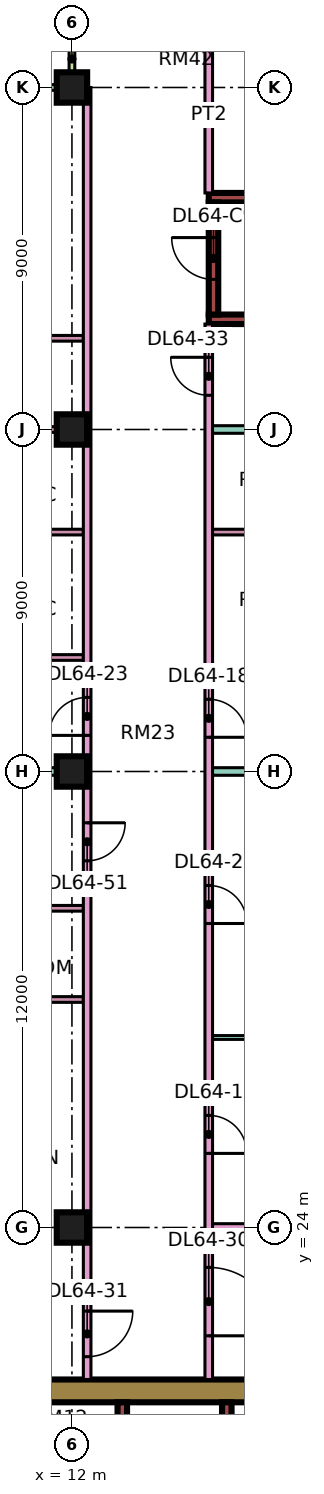
"""IFC4 building model, lengths in metres.
Left out: names, types, materials, properties, quantities, classifications, styles, units other than length and angle.
Written with IfcOpenShell. Run it as: python <this file> out.ifc"""

import sys

from ifc_helpers import new_model, si_unit, direction, frame, frame_2d, origin, origin_2d, place, context, subcontext, project, spatial, rectangle, extrude, element, fill, save


model = new_model("IFC4")
c1 = context("Model", 3, precision=1e-05, world=origin(), true_north=direction((0.0, 1.0)))
c2 = subcontext(c1, "Body", "Model", "MODEL_VIEW")
j1 = project(units=[si_unit("LENGTHUNIT", "METRE"), si_unit("PLANEANGLEUNIT", "RADIAN")], contexts=[c1])
p1 = place(None, origin())
s1 = spatial("IfcSite", under=j1, at=p1, CompositionType="ELEMENT")
p2 = place(p1, origin())
s2 = spatial("IfcBuilding", under=s1, at=p2, CompositionType="ELEMENT")
p3 = place(p2, frame((0.0, 0.0, 277.15)))
s3 = spatial("IfcBuildingStorey", under=s2, at=p3, CompositionType="ELEMENT", Elevation=277.15)
for number, where, z_axis, x_axis in (
    (1, (12.0, 24.0, 0.0), (0.0, 0.0, 1.0), (1.0, 0.0, 0.0)),
    (2, (12.0, 36.0, 0.0), (0.0, 0.0, 1.0), (1.0, 0.0, 0.0)),
    (3, (12.0, 45.0, 0.0), (0.0, 0.0, 1.0), (1.0, 0.0, 0.0)),
    (4, (12.0, 54.0, 0.0), (0.0, 0.0, 1.0), (1.0, 0.0, 0.0)),
):
    element("IfcColumn", number, at=place(p3, frame(where, z_axis=z_axis, x_axis=x_axis)), inside=s3, PredefinedType="COLUMN", context=c2, shape_type="SweptSolid", body=[
        extrude(rectangle(XDim=0.8, YDim=0.8, at=origin_2d()), origin(), (0.0, 0.0, 1.0), 3.75),
    ])
p4 = place(p3, frame((9.0, 19.7, 0.0), z_axis=(0.0, 0.0, 1.0), x_axis=(1.0, 0.0, 0.0)))
e5 = element("IfcWall", 5, at=p4, inside=s3, PredefinedType="SHEAR", context=c2, shape_type="SweptSolid", body=[
    extrude(rectangle(XDim=25.0, YDim=0.6, at=frame_2d((12.5, 0.0))), origin(), (0.0, 0.0, 1.0), 3.75),
])
p5 = place(p4, frame((19.1, 0.0, 0.0)))
e6 = element("IfcOpeningElement", 6, at=p5, cuts=e5, PredefinedType="OPENING", context=c2, shape_type="SweptSolid", body=[
    extrude(rectangle(XDim=1.8, YDim=2.4, at=frame_2d((0.9, 1.2))), frame((0.0, 0.31, 0.0), z_axis=(0.0, -1.0, 0.0), x_axis=(1.0, 0.0, 0.0)), (0.0, 0.0, 1.0), 0.62),
])
p6 = place(p3, frame((13.325, 7.6, 0.0), z_axis=(0.0, 0.0, 1.0), x_axis=(0.0, 1.0, 0.0)))
e7 = element("IfcWall", 7, at=p6, inside=s3, PredefinedType="SHEAR", context=c2, shape_type="SweptSolid", body=[
    extrude(rectangle(XDim=11.8, YDim=0.25, at=frame_2d((5.9, 0.0))), origin(), (0.0, 0.0, 1.0), 3.75),
])
p7 = place(p3, frame((16.075, 15.8, 0.0), z_axis=(0.0, 0.0, 1.0), x_axis=(0.0, 1.0, 0.0)))
e8 = element("IfcWall", 8, at=p7, inside=s3, PredefinedType="SHEAR", context=c2, shape_type="SweptSolid", body=[
    extrude(rectangle(XDim=3.6, YDim=0.25, at=frame_2d((1.8, 0.0))), origin(), (0.0, 0.0, 1.0), 3.75),
])
for number, where, z_axis, x_axis in (
    (9, (15.6, 47.9, 0.0), (0.0, 0.0, 1.0), (1.0, 0.0, 0.0)),
    (10, (15.6, 51.1, 0.0), (0.0, 0.0, 1.0), (1.0, 0.0, 0.0)),
):
    element("IfcWall", number, at=place(p3, frame(where, z_axis=z_axis, x_axis=x_axis)), inside=s3, PredefinedType="SHEAR", context=c2, shape_type="SweptSolid", body=[
        extrude(rectangle(XDim=7.0, YDim=0.25, at=frame_2d((3.5, 0.0))), origin(), (0.0, 0.0, 1.0), 3.75),
    ])
p8 = place(p3, frame((15.725, 48.025, 0.0), z_axis=(0.0, 0.0, 1.0), x_axis=(0.0, 1.0, 0.0)))
e11 = element("IfcWall", 11, at=p8, inside=s3, PredefinedType="SHEAR", context=c2, shape_type="SweptSolid", body=[
    extrude(rectangle(XDim=2.95, YDim=0.25, at=frame_2d((1.475, 0.0))), origin(), (0.0, 0.0, 1.0), 3.75),
])
p9 = place(p8, frame((0.925, 0.0, 0.0)))
e12 = element("IfcOpeningElement", 12, at=p9, cuts=e11, PredefinedType="OPENING", context=c2, shape_type="SweptSolid", body=[
    extrude(rectangle(XDim=1.1, YDim=2.2, at=frame_2d((0.55, 1.1))), frame((0.0, 0.135, 0.0), z_axis=(0.0, -1.0, 0.0), x_axis=(1.0, 0.0, 0.0)), (0.0, 0.0, 1.0), 0.27),
])
p10 = place(p3, frame((11.925, 54.0, 0.0), z_axis=(0.0, 0.0, 1.0), x_axis=(-1.0, 0.0, 0.0)))
e13 = element("IfcWall", 13, at=p10, inside=s3, PredefinedType="SOLIDWALL", context=c2, shape_type="SweptSolid", body=[
    extrude(rectangle(XDim=10.35, YDim=0.15, at=frame_2d((5.175, 0.0))), origin(), (0.0, 0.0, 1.0), 3.35),
])
p11 = place(p10, frame((0.875, 0.0, 0.45)))
e14 = element("IfcOpeningElement", 14, at=p11, cuts=e13, PredefinedType="OPENING", context=c2, shape_type="SweptSolid", body=[
    extrude(rectangle(XDim=3.0, YDim=2.4, at=frame_2d((1.5, 1.2))), frame((0.0, 0.085, 0.0), z_axis=(0.0, -1.0, 0.0), x_axis=(1.0, 0.0, 0.0)), (0.0, 0.0, 1.0), 0.17),
])
p12 = place(p10, frame((7.038, 0.0, 0.0)))
e15 = element("IfcOpeningElement", 15, at=p12, cuts=e13, PredefinedType="OPENING", context=c2, shape_type="SweptSolid", body=[
    extrude(rectangle(XDim=1.8, YDim=2.4, at=frame_2d((0.9, 1.2))), frame((0.0, 0.085, 0.0), z_axis=(0.0, -1.0, 0.0), x_axis=(1.0, 0.0, 0.0)), (0.0, 0.0, 1.0), 0.17),
])
p13 = place(p3, frame((12.0, 55.5, 0.0), z_axis=(0.0, 0.0, 1.0), x_axis=(0.0, -1.0, 0.0)))
e16 = element("IfcWall", 16, at=p13, inside=s3, PredefinedType="SOLIDWALL", context=c2, shape_type="SweptSolid", body=[
    extrude(rectangle(XDim=1.5, YDim=0.15, at=frame_2d((0.75, 0.0))), origin(), (0.0, 0.0, 1.0), 3.35),
])
p14 = place(p3, frame((-1.35, 22.4, 0.0), z_axis=(0.0, 0.0, 1.0), x_axis=(1.0, 0.0, 0.0)))
e17 = element("IfcWall", 17, at=p14, inside=s3, PredefinedType="PARTITIONING", context=c2, shape_type="SweptSolid", body=[
    extrude(rectangle(XDim=13.65, YDim=0.2, at=frame_2d((6.825, 0.0))), origin(), (0.0, 0.0, 1.0), 3.35),
])
p15 = place(p3, frame((0.0, 36.0, 0.0), z_axis=(0.0, 0.0, 1.0), x_axis=(1.0, 0.0, 0.0)))
e18 = element("IfcWall", 18, at=p15, inside=s3, PredefinedType="PARTITIONING", context=c2, shape_type="SweptSolid", body=[
    extrude(rectangle(XDim=12.3, YDim=0.2, at=frame_2d((6.15, 0.0))), origin(), (0.0, 0.0, 1.0), 3.35),
])
for number, where, z_axis, x_axis in (
    (19, (7.675, 39.0, 0.0), (0.0, 0.0, 1.0), (1.0, 0.0, 0.0)),
    (20, (7.675, 42.3, 0.0), (0.0, 0.0, 1.0), (1.0, 0.0, 0.0)),
    (21, (7.675, 45.0, 0.0), (0.0, 0.0, 1.0), (1.0, 0.0, 0.0)),
    (22, (7.675, 47.4, 0.0), (0.0, 0.0, 1.0), (1.0, 0.0, 0.0)),
):
    element("IfcWall", number, at=place(p3, frame(where, z_axis=z_axis, x_axis=x_axis)), inside=s3, PredefinedType="PARTITIONING", context=c2, shape_type="SweptSolid", body=[
        extrude(rectangle(XDim=4.625, YDim=0.15, at=frame_2d((2.312, 0.0))), origin(), (0.0, 0.0, 1.0), 3.35),
    ])
for number, where, z_axis, x_axis in (
    (23, (8.275, 30.0, 0.0), (0.0, 0.0, 1.0), (1.0, 0.0, 0.0)),
    (24, (8.275, 32.4, 0.0), (0.0, 0.0, 1.0), (1.0, 0.0, 0.0)),
):
    element("IfcWall", number, at=place(p3, frame(where, z_axis=z_axis, x_axis=x_axis)), inside=s3, PredefinedType="PARTITIONING", context=c2, shape_type="SweptSolid", body=[
        extrude(rectangle(XDim=4.025, YDim=0.15, at=frame_2d((2.013, 0.0))), origin(), (0.0, 0.0, 1.0), 3.35),
    ])
p16 = place(p3, frame((12.4, 20.0, 0.0), z_axis=(0.0, 0.0, 1.0), x_axis=(0.0, 1.0, 0.0)))
e25 = element("IfcWall", 25, at=p16, inside=s3, PredefinedType="PARTITIONING", context=c2, shape_type="SweptSolid", body=[
    extrude(rectangle(XDim=34.0, YDim=0.2, at=frame_2d((17.0, 0.0))), origin(), (0.0, 0.0, 1.0), 3.35),
])
p17 = place(p16, frame((16.95, 0.0, 0.0)))
e26 = element("IfcOpeningElement", 26, at=p17, cuts=e25, PredefinedType="OPENING", context=c2, shape_type="SweptSolid", body=[
    extrude(rectangle(XDim=1.0, YDim=2.1, at=frame_2d((0.5, 1.05))), frame((0.0, 0.11, 0.0), z_axis=(0.0, -1.0, 0.0), x_axis=(1.0, 0.0, 0.0)), (0.0, 0.0, 1.0), 0.22),
])
p18 = place(p16, frame((0.6, 0.0, 0.0)))
e27 = element("IfcOpeningElement", 27, at=p18, cuts=e25, PredefinedType="OPENING", context=c2, shape_type="SweptSolid", body=[
    extrude(rectangle(XDim=1.2, YDim=2.1, at=frame_2d((0.6, 1.05))), frame((0.0, 0.11, 0.0), z_axis=(0.0, -1.0, 0.0), x_axis=(1.0, 0.0, 0.0)), (0.0, 0.0, 1.0), 0.22),
])
p19 = place(p16, frame((13.65, 0.0, 0.0)))
e28 = element("IfcOpeningElement", 28, at=p19, cuts=e25, PredefinedType="OPENING", context=c2, shape_type="SweptSolid", body=[
    extrude(rectangle(XDim=1.0, YDim=2.1, at=frame_2d((0.5, 1.05))), frame((0.0, 0.11, 0.0), z_axis=(0.0, -1.0, 0.0), x_axis=(1.0, 0.0, 0.0)), (0.0, 0.0, 1.0), 0.22),
])
p20 = place(p3, frame((15.6, 20.0, 0.0), z_axis=(0.0, 0.0, 1.0), x_axis=(0.0, 1.0, 0.0)))
e29 = element("IfcWall", 29, at=p20, inside=s3, PredefinedType="PARTITIONING", context=c2, shape_type="SweptSolid", body=[
    extrude(rectangle(XDim=27.775, YDim=0.2, at=frame_2d((13.887, 0.0))), origin(), (0.0, 0.0, 1.0), 3.35),
])
p21 = place(p20, frame((5.95, 0.0, 0.0)))
e30 = element("IfcOpeningElement", 30, at=p21, cuts=e29, PredefinedType="OPENING", context=c2, shape_type="SweptSolid", body=[
    extrude(rectangle(XDim=1.0, YDim=2.1, at=frame_2d((0.5, 1.05))), frame((0.0, 0.11, 0.0), z_axis=(0.0, -1.0, 0.0), x_axis=(1.0, 0.0, 0.0)), (0.0, 0.0, 1.0), 0.22),
])
p22 = place(p20, frame((12.0, 0.0, 0.0)))
e31 = element("IfcOpeningElement", 31, at=p22, cuts=e29, PredefinedType="OPENING", context=c2, shape_type="SweptSolid", body=[
    extrude(rectangle(XDim=1.0, YDim=2.1, at=frame_2d((0.5, 1.05))), frame((0.0, 0.11, 0.0), z_axis=(0.0, -1.0, 0.0), x_axis=(1.0, 0.0, 0.0)), (0.0, 0.0, 1.0), 0.22),
])
p23 = place(p20, frame((16.9, 0.0, 0.0)))
e32 = element("IfcOpeningElement", 32, at=p23, cuts=e29, PredefinedType="OPENING", context=c2, shape_type="SweptSolid", body=[
    extrude(rectangle(XDim=1.0, YDim=2.1, at=frame_2d((0.5, 1.05))), frame((0.0, 0.11, 0.0), z_axis=(0.0, -1.0, 0.0), x_axis=(1.0, 0.0, 0.0)), (0.0, 0.0, 1.0), 0.22),
])
p24 = place(p20, frame((1.15, 0.0, 0.0)))
e33 = element("IfcOpeningElement", 33, at=p24, cuts=e29, PredefinedType="OPENING", context=c2, shape_type="SweptSolid", body=[
    extrude(rectangle(XDim=1.8, YDim=2.1, at=frame_2d((0.9, 1.05))), frame((0.0, 0.11, 0.0), z_axis=(0.0, -1.0, 0.0), x_axis=(1.0, 0.0, 0.0)), (0.0, 0.0, 1.0), 0.22),
])
p25 = place(p20, frame((25.9, 0.0, 0.0)))
e34 = element("IfcOpeningElement", 34, at=p25, cuts=e29, PredefinedType="OPENING", context=c2, shape_type="SweptSolid", body=[
    extrude(rectangle(XDim=1.0, YDim=2.1, at=frame_2d((0.5, 1.05))), frame((0.0, 0.11, 0.0), z_axis=(0.0, -1.0, 0.0), x_axis=(1.0, 0.0, 0.0)), (0.0, 0.0, 1.0), 0.22),
])
p26 = place(p3, frame((15.6, 51.225, 0.0), z_axis=(0.0, 0.0, 1.0), x_axis=(0.0, 1.0, 0.0)))
e35 = element("IfcWall", 35, at=p26, inside=s3, PredefinedType="PARTITIONING", context=c2, shape_type="SweptSolid", body=[
    extrude(rectangle(XDim=4.125, YDim=0.2, at=frame_2d((2.062, 0.0))), origin(), (0.0, 0.0, 1.0), 3.35),
])
p27 = place(p3, frame((15.7, 24.0, 0.0), z_axis=(0.0, 0.0, 1.0), x_axis=(1.0, 0.0, 0.0)))
e36 = element("IfcWall", 36, at=p27, inside=s3, PredefinedType="PARTITIONING", context=c2, shape_type="SweptSolid", body=[
    extrude(rectangle(XDim=5.8, YDim=0.2, at=frame_2d((2.9, 0.0))), origin(), (0.0, 0.0, 1.0), 3.35),
])
p28 = place(p3, frame((15.7, 29.0, 0.0), z_axis=(0.0, 0.0, 1.0), x_axis=(1.0, 0.0, 0.0)))
e37 = element("IfcWall", 37, at=p28, inside=s3, PredefinedType="PARTITIONING", context=c2, shape_type="SweptSolid", body=[
    extrude(rectangle(XDim=5.8, YDim=0.1, at=frame_2d((2.9, 0.0))), origin(), (0.0, 0.0, 1.0), 3.35),
])
p29 = place(p3, frame((15.7, 36.0, 0.0), z_axis=(0.0, 0.0, 1.0), x_axis=(1.0, 0.0, 0.0)))
e38 = element("IfcWall", 38, at=p29, inside=s3, PredefinedType="PARTITIONING", context=c2, shape_type="SweptSolid", body=[
    extrude(rectangle(XDim=8.3, YDim=0.2, at=frame_2d((4.15, 0.0))), origin(), (0.0, 0.0, 1.0), 3.35),
])
for number, where, z_axis, x_axis in (
    (39, (15.7, 38.7, 0.0), (0.0, 0.0, 1.0), (1.0, 0.0, 0.0)),
    (40, (15.7, 42.3, 0.0), (0.0, 0.0, 1.0), (1.0, 0.0, 0.0)),
):
    element("IfcWall", number, at=place(p3, frame(where, z_axis=z_axis, x_axis=x_axis)), inside=s3, PredefinedType="PARTITIONING", context=c2, shape_type="SweptSolid", body=[
        extrude(rectangle(XDim=2.525, YDim=0.15, at=frame_2d((1.263, 0.0))), origin(), (0.0, 0.0, 1.0), 3.35),
    ])
p30 = place(p3, frame((15.7, 45.0, 0.0), z_axis=(0.0, 0.0, 1.0), x_axis=(1.0, 0.0, 0.0)))
e41 = element("IfcWall", 41, at=p30, inside=s3, PredefinedType="PARTITIONING", context=c2, shape_type="SweptSolid", body=[
    extrude(rectangle(XDim=8.3, YDim=0.2, at=frame_2d((4.15, 0.0))), origin(), (0.0, 0.0, 1.0), 3.35),
])
p31 = place(p9, frame((1.1, 0.0, 0.0), z_axis=(0.0, 0.0, 1.0), x_axis=(-1.0, 0.0, 0.0)))
e42 = element("IfcDoor", 42, at=p31, inside=s3, OperationType="SINGLE_SWING_RIGHT", PredefinedType="DOOR", context=c2, shape_type="SweptSolid", body=[
    extrude(rectangle(XDim=1.1, YDim=2.2, at=frame_2d((0.55, 1.1))), frame((0.0, 0.025, 0.0), z_axis=(0.0, -1.0, 0.0), x_axis=(1.0, 0.0, 0.0)), (0.0, 0.0, 1.0), 0.05),
])
fill(e12, e42)
p32 = place(p21, frame((1.0, 0.0, 0.0), z_axis=(0.0, 0.0, 1.0), x_axis=(-1.0, 0.0, 0.0)))
e43 = element("IfcDoor", 43, at=p32, inside=s3, OperationType="SINGLE_SWING_LEFT", PredefinedType="DOOR", context=c2, shape_type="SweptSolid", body=[
    extrude(rectangle(XDim=1.0, YDim=2.1, at=frame_2d((0.5, 1.05))), frame((0.0, 0.025, 0.0), z_axis=(0.0, -1.0, 0.0), x_axis=(1.0, 0.0, 0.0)), (0.0, 0.0, 1.0), 0.05),
])
fill(e30, e43)
p33 = place(p22, frame((1.0, 0.0, 0.0), z_axis=(0.0, 0.0, 1.0), x_axis=(-1.0, 0.0, 0.0)))
e44 = element("IfcDoor", 44, at=p33, inside=s3, OperationType="SINGLE_SWING_LEFT", PredefinedType="DOOR", context=c2, shape_type="SweptSolid", body=[
    extrude(rectangle(XDim=1.0, YDim=2.1, at=frame_2d((0.5, 1.05))), frame((0.0, 0.025, 0.0), z_axis=(0.0, -1.0, 0.0), x_axis=(1.0, 0.0, 0.0)), (0.0, 0.0, 1.0), 0.05),
])
fill(e31, e44)
p34 = place(p23, frame((1.0, 0.0, 0.0), z_axis=(0.0, 0.0, 1.0), x_axis=(-1.0, 0.0, 0.0)))
e45 = element("IfcDoor", 45, at=p34, inside=s3, OperationType="SINGLE_SWING_LEFT", PredefinedType="DOOR", context=c2, shape_type="SweptSolid", body=[
    extrude(rectangle(XDim=1.0, YDim=2.1, at=frame_2d((0.5, 1.05))), frame((0.0, 0.025, 0.0), z_axis=(0.0, -1.0, 0.0), x_axis=(1.0, 0.0, 0.0)), (0.0, 0.0, 1.0), 0.05),
])
fill(e32, e45)
p35 = place(p17, origin())
e46 = element("IfcDoor", 46, at=p35, inside=s3, OperationType="SINGLE_SWING_LEFT", PredefinedType="DOOR", context=c2, shape_type="SweptSolid", body=[
    extrude(rectangle(XDim=1.0, YDim=2.1, at=frame_2d((0.5, 1.05))), frame((0.0, 0.025, 0.0), z_axis=(0.0, -1.0, 0.0), x_axis=(1.0, 0.0, 0.0)), (0.0, 0.0, 1.0), 0.05),
])
fill(e26, e46)
p36 = place(p24, frame((1.8, 0.0, 0.0), z_axis=(0.0, 0.0, 1.0), x_axis=(-1.0, 0.0, 0.0)))
e47 = element("IfcDoor", 47, at=p36, inside=s3, OperationType="DOUBLE_DOOR_SINGLE_SWING", PredefinedType="DOOR", context=c2, shape_type="SweptSolid", body=[
    extrude(rectangle(XDim=1.8, YDim=2.1, at=frame_2d((0.9, 1.05))), frame((0.0, 0.025, 0.0), z_axis=(0.0, -1.0, 0.0), x_axis=(1.0, 0.0, 0.0)), (0.0, 0.0, 1.0), 0.05),
])
fill(e33, e47)
p37 = place(p18, origin())
e48 = element("IfcDoor", 48, at=p37, inside=s3, OperationType="SINGLE_SWING_RIGHT", PredefinedType="DOOR", context=c2, shape_type="SweptSolid", body=[
    extrude(rectangle(XDim=1.2, YDim=2.1, at=frame_2d((0.6, 1.05))), frame((0.0, 0.025, 0.0), z_axis=(0.0, -1.0, 0.0), x_axis=(1.0, 0.0, 0.0)), (0.0, 0.0, 1.0), 0.05),
])
fill(e27, e48)
p38 = place(p25, frame((1.0, 0.0, 0.0), z_axis=(0.0, 0.0, 1.0), x_axis=(-1.0, 0.0, 0.0)))
e49 = element("IfcDoor", 49, at=p38, inside=s3, OperationType="SINGLE_SWING_RIGHT", PredefinedType="DOOR", context=c2, shape_type="SweptSolid", body=[
    extrude(rectangle(XDim=1.0, YDim=2.1, at=frame_2d((0.5, 1.05))), frame((0.0, 0.025, 0.0), z_axis=(0.0, -1.0, 0.0), x_axis=(1.0, 0.0, 0.0)), (0.0, 0.0, 1.0), 0.05),
])
fill(e34, e49)
p39 = place(p19, origin())
e50 = element("IfcDoor", 50, at=p39, inside=s3, OperationType="SINGLE_SWING_RIGHT", PredefinedType="DOOR", context=c2, shape_type="SweptSolid", body=[
    extrude(rectangle(XDim=1.0, YDim=2.1, at=frame_2d((0.5, 1.05))), frame((0.0, 0.025, 0.0), z_axis=(0.0, -1.0, 0.0), x_axis=(1.0, 0.0, 0.0)), (0.0, 0.0, 1.0), 0.05),
])
fill(e28, e50)
save(model, sys.argv[1])
